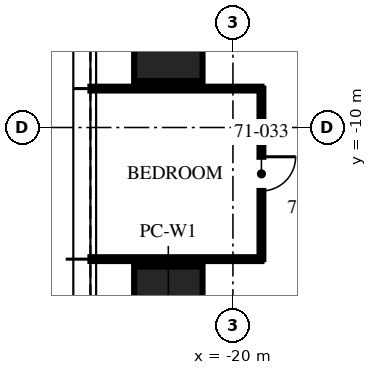
"""IFC4 building model, lengths in metres.
Left out: names, types, materials, properties, quantities, classifications, styles, units other than length and angle.
Written with IfcOpenShell. Run it as: python <this file> out.ifc"""

import sys

from ifc_helpers import new_model, si_unit, direction, frame, frame_2d, origin, origin_2d, place, context, subcontext, project, spatial, rectangle, extrude, element, fill, save


model = new_model("IFC4")
c1 = context("Model", 3, precision=1e-05, world=origin(), true_north=direction((0.0, 1.0)))
c2 = subcontext(c1, "Body", "Model", "MODEL_VIEW")
j1 = project(units=[si_unit("LENGTHUNIT", "METRE"), si_unit("PLANEANGLEUNIT", "RADIAN")], contexts=[c1])
p1 = place(None, origin())
s1 = spatial("IfcSite", under=j1, at=p1, CompositionType="ELEMENT")
p2 = place(p1, origin())
s2 = spatial("IfcBuilding", under=s1, at=p2, CompositionType="ELEMENT")
p3 = place(p2, frame((0.0, 0.0, 285.75)))
s3 = spatial("IfcBuildingStorey", under=s2, at=p3, CompositionType="ELEMENT", Elevation=285.75)
p4 = place(p3, frame((-21.7, -14.96, 0.04), z_axis=(0.0, 0.0, 1.0), x_axis=(0.0, 1.0, 0.0)))
e1 = element("IfcColumn", 1, at=p4, inside=s3, PredefinedType="COLUMN", context=c2, shape_type="SweptSolid", body=[
    extrude(rectangle(XDim=2.6, YDim=1.8, at=origin_2d()), origin(), (0.0, 0.0, 1.0), 3.71),
])
p5 = place(p3, frame((-21.7, -7.48, -0.09), z_axis=(0.0, 0.0, 1.0), x_axis=(0.0, 1.0, 0.0)))
e2 = element("IfcColumn", 2, at=p5, inside=s3, PredefinedType="COLUMN", context=c2, shape_type="SweptSolid", body=[
    extrude(rectangle(XDim=2.6, YDim=1.8, at=origin_2d()), origin(), (0.0, 0.0, 1.0), 3.84),
])
for number, where, z_axis, x_axis in (
    (3, (-19.25, -8.976, 0.0), (0.0, 0.0, 1.0), (-1.0, 0.0, 0.0)),
    (4, (-19.25, -13.464, 0.0), (0.0, 0.0, 1.0), (-1.0, 0.0, 0.0)),
):
    element("IfcWall", number, at=place(p3, frame(where, z_axis=z_axis, x_axis=x_axis)), inside=s3, PredefinedType="PARTITIONING", context=c2, shape_type="SweptSolid", body=[
        extrude(rectangle(XDim=4.5, YDim=0.1, at=frame_2d((2.25, 0.0))), origin(), (0.0, 0.0, 1.0), 3.01),
    ])
p6 = place(p3, frame((-19.25, -8.976, 0.0), z_axis=(0.0, 0.0, 1.0), x_axis=(0.0, -1.0, 0.0)))
e5 = element("IfcWall", 5, at=p6, inside=s3, PredefinedType="PARTITIONING", context=c2, shape_type="SweptSolid", body=[
    extrude(rectangle(XDim=4.488, YDim=0.1, at=frame_2d((2.244, 0.0))), origin(), (0.0, 0.0, 1.0), 2.91),
])
p7 = place(p6, frame((1.794, 0.0, 0.0)))
e6 = element("IfcOpeningElement", 6, at=p7, cuts=e5, PredefinedType="OPENING", context=c2, shape_type="SweptSolid", body=[
    extrude(rectangle(XDim=0.9, YDim=2.1, at=frame_2d((0.45, 1.05))), frame((0.0, 0.06, 0.0), z_axis=(0.0, -1.0, 0.0), x_axis=(1.0, 0.0, 0.0)), (0.0, 0.0, 1.0), 0.12),
])
p8 = place(p7, origin())
e7 = element("IfcDoor", 7, at=p8, inside=s3, OperationType="SINGLE_SWING_LEFT", PredefinedType="DOOR", context=c2, shape_type="SweptSolid", body=[
    extrude(rectangle(XDim=0.9, YDim=2.1, at=frame_2d((0.45, 1.05))), frame((0.0, 0.025, 0.0), z_axis=(0.0, -1.0, 0.0), x_axis=(1.0, 0.0, 0.0)), (0.0, 0.0, 1.0), 0.05),
])
fill(e6, e7)
save(model, sys.argv[1])
